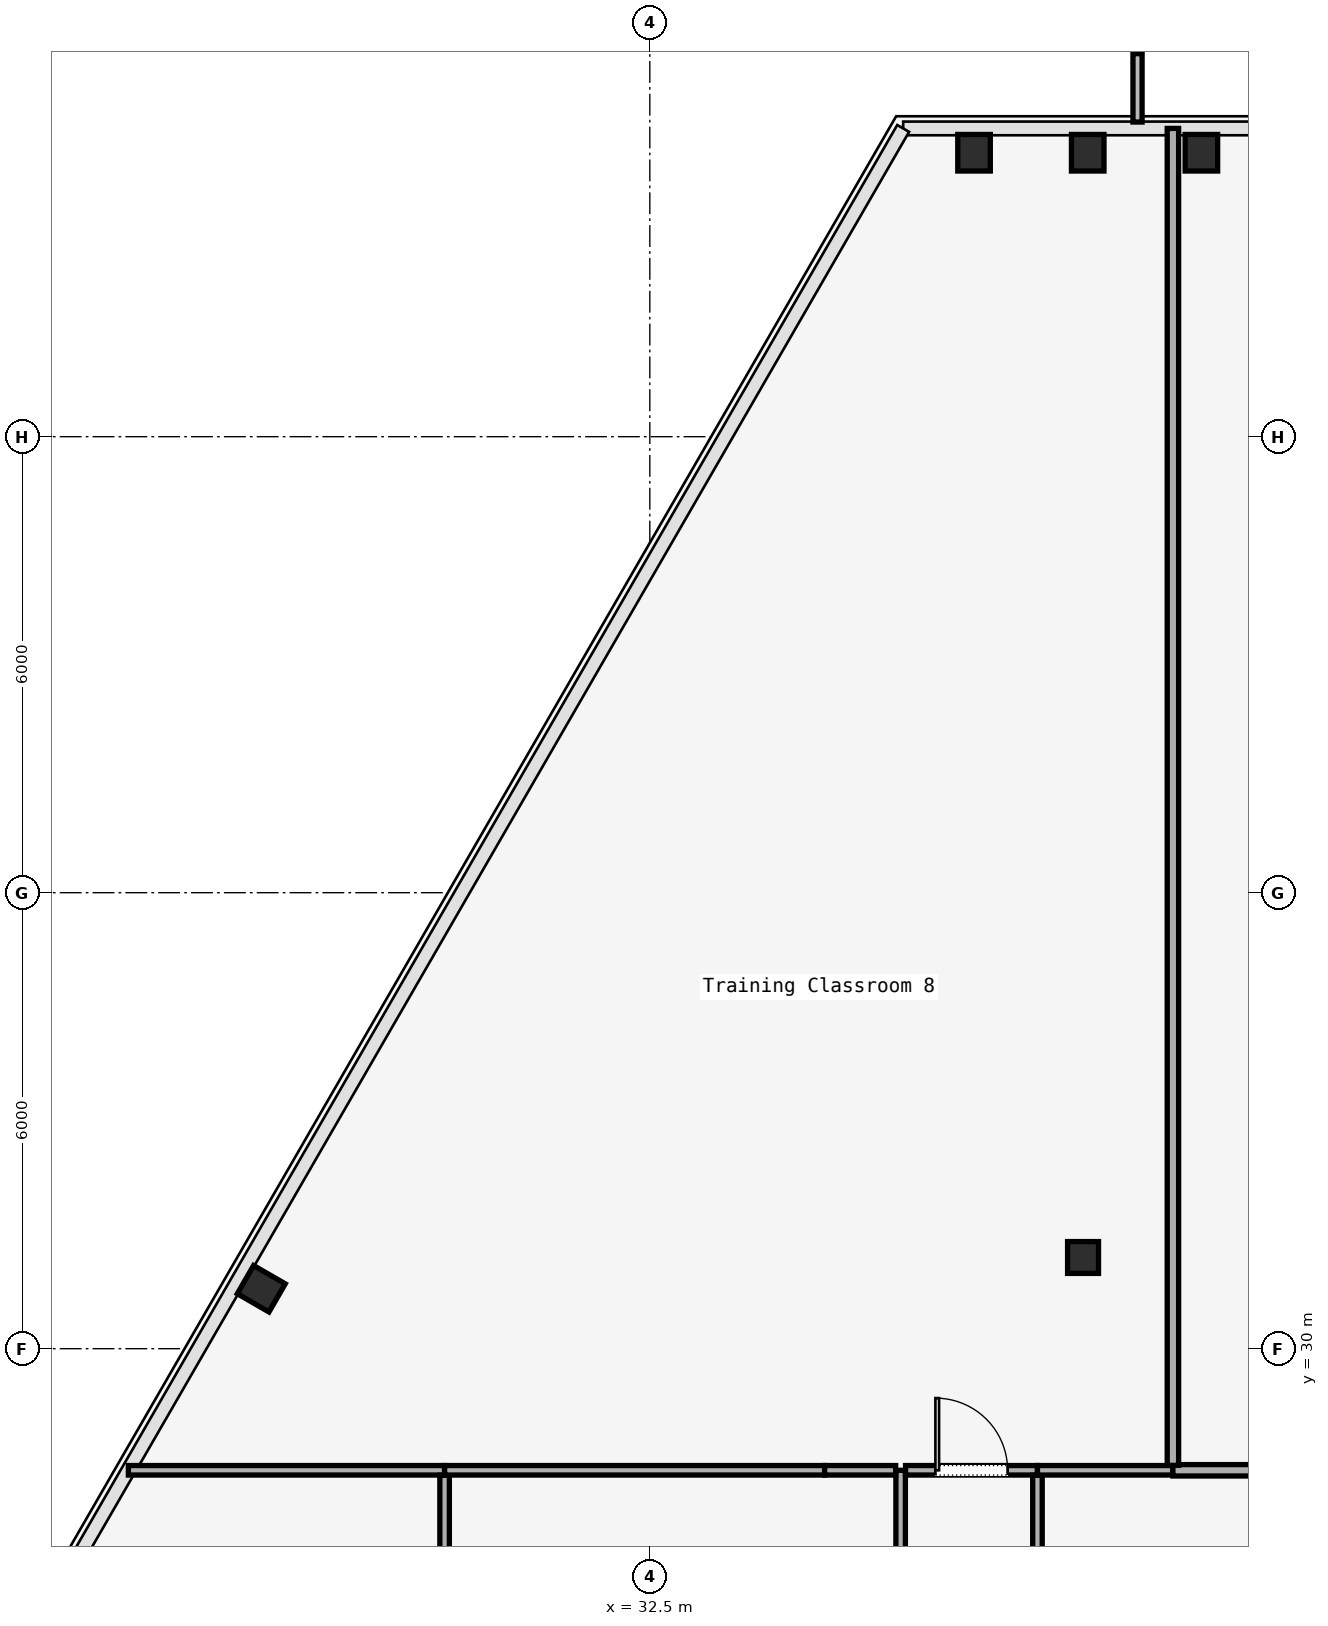
"""IFC4 building model, lengths in metres.
Left out: names, types, materials, properties, quantities, classifications, styles, units other than length and angle.
Written with IfcOpenShell. Run it as: python <this file> out.ifc"""

import sys

from ifc_helpers import new_model, si_unit, direction, frame, frame_2d, origin, origin_2d, place, context, subcontext, project, spatial, rectangle, i_section, extrude, element, fill, save


model = new_model("IFC4")
c1 = context("Model", 3, precision=1e-05, world=origin(), true_north=direction((0.0, 1.0)))
c2 = subcontext(c1, "Body", "Model", "MODEL_VIEW")
j1 = project(units=[si_unit("LENGTHUNIT", "METRE"), si_unit("PLANEANGLEUNIT", "RADIAN")], contexts=[c1])
p1 = place(None, origin())
s1 = spatial("IfcSite", under=j1, at=p1, CompositionType="ELEMENT")
p2 = place(p1, origin())
s2 = spatial("IfcBuilding", under=s1, at=p2, CompositionType="ELEMENT")
p3 = place(p2, frame((0.0, 0.0, 127.0)))
s3 = spatial("IfcBuildingStorey", under=s2, at=p3, CompositionType="ELEMENT", Elevation=127.0)
p4 = place(p3, frame((38.2, 31.2, 0.0), z_axis=(0.0, 0.0, 1.0), x_axis=(1.0, 0.0, 0.0)))
e1 = element("IfcColumn", 1, at=p4, inside=s3, PredefinedType="COLUMN", context=c2, shape_type="SweptSolid", body=[
    extrude(i_section(OverallWidth=0.407, OverallDepth=0.419, WebThickness=0.031, FlangeThickness=0.049, FilletRadius=0.015, at=origin_2d()), origin(), (0.0, 0.0, 1.0), 3.58),
])
for number, where, z_axis, x_axis in (
    (2, (39.757, 45.736, 0.0), (0.0, 0.0, 1.0), (1.0, 0.0, 0.0)),
    (3, (38.261, 45.736, 0.0), (0.0, 0.0, 1.0), (1.0, 0.0, 0.0)),
    (4, (36.766, 45.736, 0.0), (0.0, 0.0, 1.0), (1.0, 0.0, 0.0)),
    (5, (27.388, 30.789, 0.0), (0.0, 0.0, 1.0), (0.5, 0.866, 0.0)),
):
    element("IfcColumn", number, at=place(p3, frame(where, z_axis=z_axis, x_axis=x_axis)), inside=s3, PredefinedType="COLUMN", context=c2, shape_type="SweptSolid", body=[
        extrude(i_section(OverallWidth=0.428, OverallDepth=0.481, WebThickness=0.051, FlangeThickness=0.065, FilletRadius=0.015, at=origin_2d()), origin(), (0.0, 0.0, 1.0), 3.58),
    ])
p5 = place(p3, frame((35.8, 24.575, 0.0), z_axis=(0.0, 0.0, 1.0), x_axis=(0.0, 1.0, 0.0)))
e6 = element("IfcWall", 6, at=p5, inside=s3, PredefinedType="PARTITIONING", context=c2, shape_type="SweptSolid", body=[
    extrude(rectangle(XDim=3.825, YDim=0.125, at=frame_2d((1.912, 0.0))), origin(), (0.0, 0.0, 1.0), 3.01),
])
p6 = place(p5, frame((1.437, 0.0, 0.0)))
e7 = element("IfcOpeningElement", 7, at=p6, cuts=e6, PredefinedType="OPENING", context=c2, shape_type="SweptSolid", body=[
    extrude(rectangle(XDim=0.95, YDim=2.2, at=frame_2d((0.475, 1.1))), frame((0.0, 0.062, 0.0), z_axis=(0.0, -1.0, 0.0), x_axis=(1.0, 0.0, 0.0)), (0.0, 0.0, 1.0), 0.125),
])
p7 = place(p3, frame((35.865, 28.4, 0.0), z_axis=(0.0, 0.0, 1.0), x_axis=(1.0, 0.0, 0.0)))
e8 = element("IfcWall", 8, at=p7, inside=s3, PredefinedType="PARTITIONING", context=c2, shape_type="SweptSolid", body=[
    extrude(rectangle(XDim=1.735, YDim=0.125, at=frame_2d((0.868, 0.0))), origin(), (0.0, 0.0, 1.0), 3.01),
])
p8 = place(p7, frame((0.393, 0.0, 0.0)))
e9 = element("IfcOpeningElement", 9, at=p8, cuts=e8, PredefinedType="OPENING", context=c2, shape_type="SweptSolid", body=[
    extrude(rectangle(XDim=0.95, YDim=2.2, at=frame_2d((0.475, 1.1))), frame((0.0, 0.062, 0.0), z_axis=(0.0, -1.0, 0.0), x_axis=(1.0, 0.0, 0.0)), (0.0, 0.0, 1.0), 0.125),
])
p9 = place(p3, frame((37.6, 28.335, 0.0), z_axis=(0.0, 0.0, 1.0), x_axis=(0.0, -1.0, 0.0)))
e10 = element("IfcWall", 10, at=p9, inside=s3, PredefinedType="PARTITIONING", context=c2, shape_type="SweptSolid", body=[
    extrude(rectangle(XDim=3.77, YDim=0.125, at=frame_2d((1.885, 0.0))), origin(), (0.0, 0.0, 1.0), 3.01),
])
p10 = place(p9, frame((1.41, 0.0, 0.0)))
e11 = element("IfcOpeningElement", 11, at=p10, cuts=e10, PredefinedType="OPENING", context=c2, shape_type="SweptSolid", body=[
    extrude(rectangle(XDim=0.95, YDim=2.2, at=frame_2d((0.475, 1.1))), frame((0.0, 0.062, 0.0), z_axis=(0.0, -1.0, 0.0), x_axis=(1.0, 0.0, 0.0)), (0.0, 0.0, 1.0), 0.125),
])
p11 = place(p3, frame((25.639, 28.4, 0.0), z_axis=(0.0, 0.0, 1.0), x_axis=(1.0, 0.0, 0.0)))
e12 = element("IfcWall", 12, at=p11, inside=s3, PredefinedType="PARTITIONING", context=c2, shape_type="SweptSolid", body=[
    extrude(rectangle(XDim=4.161, YDim=0.125, at=frame_2d((2.08, 0.0))), origin(), (0.0, 0.0, 1.0), 3.01),
])
p12 = place(p3, frame((29.8, 28.335, 0.0), z_axis=(0.0, 0.0, 1.0), x_axis=(0.0, -1.0, 0.0)))
e13 = element("IfcWall", 13, at=p12, inside=s3, PredefinedType="PARTITIONING", context=c2, shape_type="SweptSolid", body=[
    extrude(rectangle(XDim=3.76, YDim=0.125, at=frame_2d((1.88, 0.0))), origin(), (0.0, 0.0, 1.0), 3.01),
])
p13 = place(p3, frame((37.6, 28.4, 0.0), z_axis=(0.0, 0.0, 1.0), x_axis=(1.0, 0.0, 0.0)))
e14 = element("IfcWall", 14, at=p13, inside=s3, PredefinedType="PARTITIONING", context=c2, shape_type="SweptSolid", body=[
    extrude(rectangle(XDim=1.782, YDim=0.125, at=frame_2d((0.891, 0.0))), origin(), (0.0, 0.0, 1.0), 3.01),
])
p14 = place(p3, frame((39.382, 28.4, 0.0), z_axis=(0.0, 0.0, 1.0), x_axis=(1.0, 0.0, 0.0)))
e15 = element("IfcWall", 15, at=p14, inside=s3, PredefinedType="PARTITIONING", context=c2, shape_type="SweptSolid", body=[
    extrude(rectangle(XDim=1.933, YDim=0.15, at=frame_2d((0.966, 0.0))), origin(), (0.0, 0.0, 1.0), 3.01),
])
p15 = place(p3, frame((29.8, 28.4, 0.0), z_axis=(0.0, 0.0, 1.0), x_axis=(1.0, 0.0, 0.0)))
e16 = element("IfcWall", 16, at=p15, inside=s3, PredefinedType="PARTITIONING", context=c2, shape_type="SweptSolid", body=[
    extrude(rectangle(XDim=5.0, YDim=0.125, at=frame_2d((2.5, 0.0))), origin(), (0.0, 0.0, 1.0), 3.01),
])
p16 = place(p3, frame((34.8, 28.4, 0.0), z_axis=(0.0, 0.0, 1.0), x_axis=(1.0, 0.0, 0.0)))
e17 = element("IfcWall", 17, at=p16, inside=s3, PredefinedType="PARTITIONING", context=c2, shape_type="SweptSolid", body=[
    extrude(rectangle(XDim=0.935, YDim=0.125, at=frame_2d((0.468, 0.0))), origin(), (0.0, 0.0, 1.0), 3.01),
])
p17 = place(p3, frame((39.382, 46.056, 0.0), z_axis=(0.0, 0.0, 1.0), x_axis=(0.0, -1.0, 0.0)))
e18 = element("IfcWall", 18, at=p17, inside=s3, PredefinedType="PARTITIONING", context=c2, shape_type="SweptSolid", body=[
    extrude(rectangle(XDim=17.591, YDim=0.15, at=frame_2d((8.795, 0.0))), origin(), (0.0, 0.0, 1.0), 3.01),
])
p18 = place(p8, origin())
e19 = element("IfcDoor", 19, at=p18, inside=s3, OperationType="SINGLE_SWING_RIGHT", PredefinedType="DOOR", context=c2, shape_type="SweptSolid", body=[
    extrude(rectangle(XDim=0.95, YDim=2.2, at=frame_2d((0.475, 1.1))), frame((0.0, 0.025, 0.0), z_axis=(0.0, -1.0, 0.0), x_axis=(1.0, 0.0, 0.0)), (0.0, 0.0, 1.0), 0.05),
])
fill(e9, e19)
save(model, sys.argv[1])
